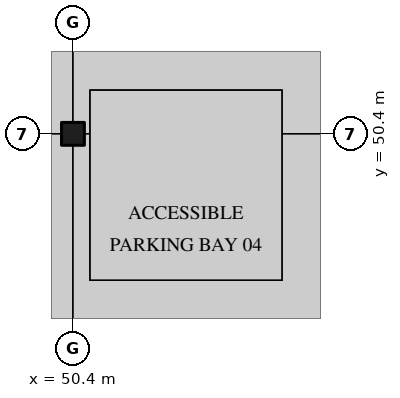
"""IFC4 building model, lengths in metres.
Left out: names, types, materials, properties, quantities, classifications, styles, units other than length and angle.
Written with IfcOpenShell. Run it as: python <this file> out.ifc"""

import sys

from ifc_helpers import new_model, si_unit, direction, frame, origin, origin_2d, place, context, subcontext, project, spatial, rectangle, extrude, element, save


model = new_model("IFC4")
c1 = context("Model", 3, precision=1e-05, world=origin(), true_north=direction((0.0, 1.0)))
c2 = subcontext(c1, "Body", "Model", "MODEL_VIEW")
j1 = project(units=[si_unit("LENGTHUNIT", "METRE"), si_unit("PLANEANGLEUNIT", "RADIAN")], contexts=[c1])
p1 = place(None, origin())
s1 = spatial("IfcSite", under=j1, at=p1, CompositionType="ELEMENT")
p2 = place(p1, origin())
s2 = spatial("IfcBuilding", under=s1, at=p2, CompositionType="ELEMENT")
p3 = place(p2, frame((0.0, 0.0, -4.5)))
s3 = spatial("IfcBuildingStorey", under=s2, at=p3, CompositionType="ELEMENT", Elevation=-4.5)
p4 = place(p3, frame((50.4, 50.4, 0.0), z_axis=(0.0, 0.0, 1.0), x_axis=(1.0, 0.0, 0.0)))
e1 = element("IfcColumn", 1, at=p4, inside=s3, PredefinedType="COLUMN", context=c2, shape_type="SweptSolid", body=[
    extrude(rectangle(XDim=0.6, YDim=0.6, at=origin_2d()), origin(), (0.0, 0.0, 1.0), 4.05),
])
save(model, sys.argv[1])
